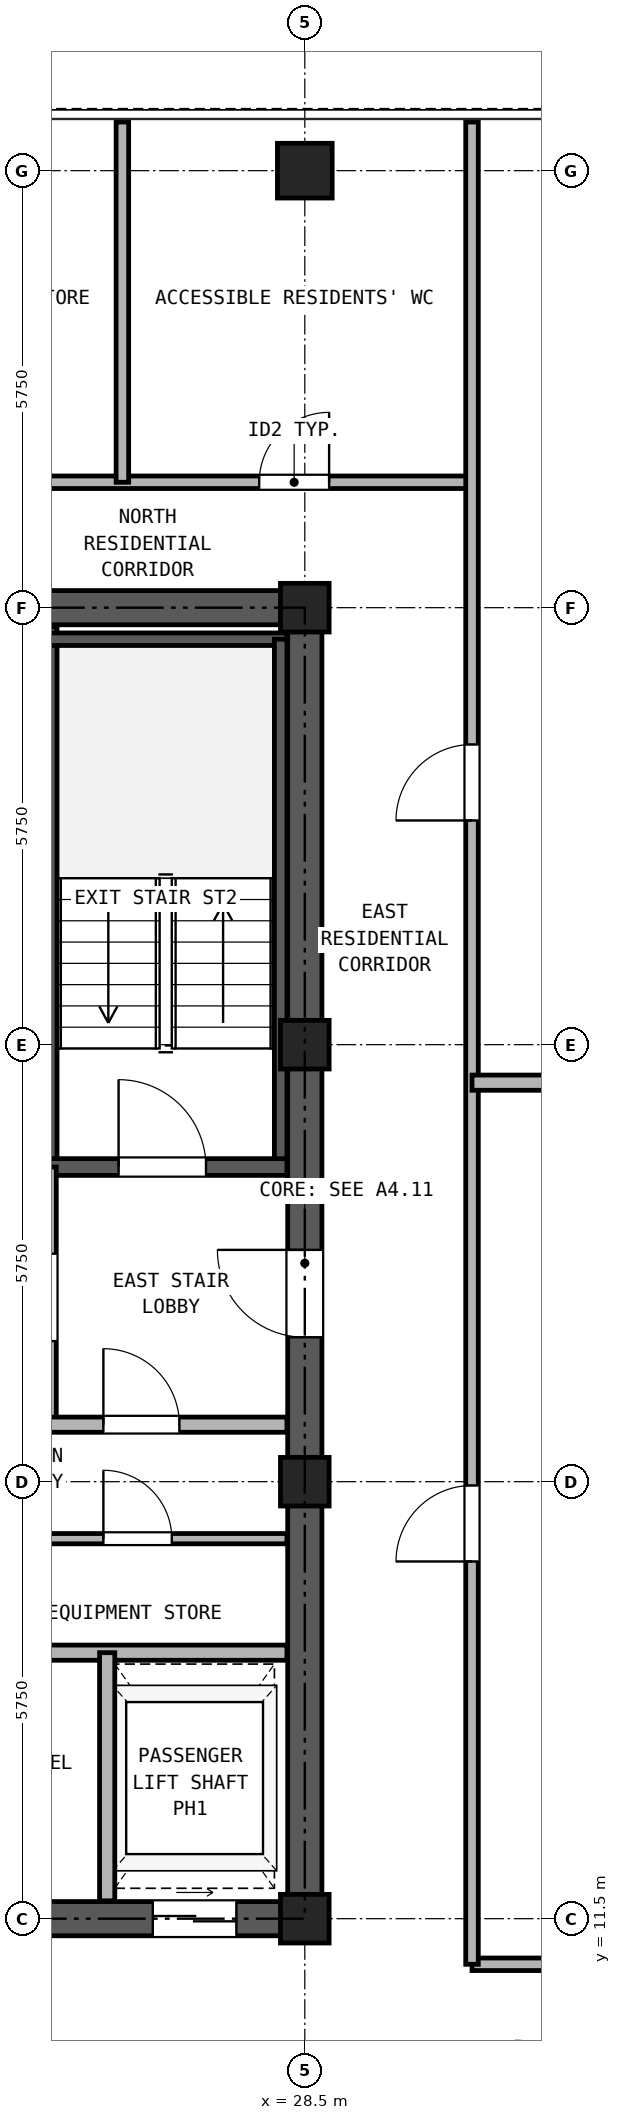
"""IFC4 building model, lengths in metres.
Left out: names, types, materials, properties, quantities, classifications, styles, units other than length and angle.
Written with IfcOpenShell. Run it as: python <this file> out.ifc"""

import sys

from ifc_helpers import new_model, si_unit, direction, frame, frame_2d, origin, origin_2d, place, context, subcontext, project, spatial, rectangle, hollow_rectangle, extrude, source, transform, mapped, element, fill, save


model = new_model("IFC4")
c1 = context("Model", 3, precision=1e-05, world=origin(), true_north=direction((0.0, 1.0)))
c2 = subcontext(c1, "Body", "Model", "MODEL_VIEW")
j1 = project(units=[si_unit("LENGTHUNIT", "METRE"), si_unit("PLANEANGLEUNIT", "RADIAN")], contexts=[c1])
p1 = place(None, origin())
s1 = spatial("IfcSite", under=j1, at=p1, CompositionType="ELEMENT")
p2 = place(p1, origin())
s2 = spatial("IfcBuilding", under=s1, at=p2, CompositionType="ELEMENT")
p3 = place(p2, frame((0.0, 0.0, 159.3)))
s3 = spatial("IfcBuildingStorey", under=s2, at=p3, CompositionType="ELEMENT", Elevation=159.3)
m1 = source(origin(), c2, "Body", "SweptSolid", [
    extrude(hollow_rectangle(XDim=0.72, YDim=0.72, WallThickness=0.04, at=origin_2d()), origin(), (0.0, 0.0, 1.0), 2.95),
])
p4 = place(p3, frame((28.5, 34.5, 0.0), z_axis=(0.0, 0.0, 1.0), x_axis=(1.0, 0.0, 0.0)))
e1 = element("IfcColumn", 1, at=p4, inside=s3, PredefinedType="COLUMN", context=c2, shape_type="MappedRepresentation", body=[
    mapped(m1, transform((0.0, 0.0, 0.0), x_axis=(1.0, 0.0, 0.0), y_axis=(0.0, 1.0, 0.0), z_axis=(0.0, 0.0, 1.0), scale=1.0)),
])
m2 = source(origin(), c2, "Body", "SweptSolid", [
    extrude(hollow_rectangle(XDim=0.64, YDim=0.64, WallThickness=0.035, at=origin_2d()), origin(), (0.0, 0.0, 1.0), 2.95),
])
for number, where, z_axis, x_axis in (
    (2, (28.5, 11.5, 0.0), (0.0, 0.0, 1.0), (1.0, 0.0, 0.0)),
    (3, (28.5, 17.25, 0.0), (0.0, 0.0, 1.0), (1.0, 0.0, 0.0)),
    (4, (28.5, 23.0, 0.0), (0.0, 0.0, 1.0), (1.0, 0.0, 0.0)),
    (5, (28.5, 28.75, 0.0), (0.0, 0.0, 1.0), (1.0, 0.0, 0.0)),
):
    element("IfcColumn", number, at=place(p3, frame(where, z_axis=z_axis, x_axis=x_axis)), inside=s3, PredefinedType="COLUMN", context=c2, shape_type="MappedRepresentation", body=[
        mapped(m2, transform((0.0, 0.0, 0.0), x_axis=(1.0, 0.0, 0.0), y_axis=(0.0, 1.0, 0.0), z_axis=(0.0, 0.0, 1.0), scale=1.0)),
    ])
p5 = place(p3, frame((18.275, 11.5, 0.0), z_axis=(0.0, 0.0, 1.0), x_axis=(1.0, 0.0, 0.0)))
e6 = element("IfcWall", 6, at=p5, inside=s3, PredefinedType="SHEAR", context=c2, shape_type="SweptSolid", body=[
    extrude(rectangle(XDim=10.45, YDim=0.45, at=frame_2d((5.225, 0.0))), origin(), (0.0, 0.0, 1.0), 2.95),
])
p6 = place(p5, frame((1.825, 0.0, 0.0)))
e7 = element("IfcOpeningElement", 7, at=p6, cuts=e6, PredefinedType="OPENING", context=c2, shape_type="SweptSolid", body=[
    extrude(rectangle(XDim=0.95, YDim=2.15, at=frame_2d((0.475, 1.075))), frame((0.0, 0.235, 0.0), z_axis=(0.0, -1.0, 0.0), x_axis=(1.0, 0.0, 0.0)), (0.0, 0.0, 1.0), 0.47),
])
p7 = place(p5, frame((5.325, 0.0, 0.0)))
e8 = element("IfcOpeningElement", 8, at=p7, cuts=e6, PredefinedType="OPENING", context=c2, shape_type="SweptSolid", body=[
    extrude(rectangle(XDim=0.95, YDim=2.15, at=frame_2d((0.475, 1.075))), frame((0.0, 0.235, 0.0), z_axis=(0.0, -1.0, 0.0), x_axis=(1.0, 0.0, 0.0)), (0.0, 0.0, 1.0), 0.47),
])
p8 = place(p5, frame((8.225, 0.0, 0.0)))
e9 = element("IfcOpeningElement", 9, at=p8, cuts=e6, PredefinedType="OPENING", context=c2, shape_type="SweptSolid", body=[
    extrude(rectangle(XDim=1.1, YDim=2.25, at=frame_2d((0.55, 1.125))), frame((0.0, 0.235, 0.0), z_axis=(0.0, -1.0, 0.0), x_axis=(1.0, 0.0, 0.0)), (0.0, 0.0, 1.0), 0.47),
])
p9 = place(p3, frame((18.275, 28.75, 0.0), z_axis=(0.0, 0.0, 1.0), x_axis=(1.0, 0.0, 0.0)))
e10 = element("IfcWall", 10, at=p9, inside=s3, PredefinedType="SHEAR", context=c2, shape_type="SweptSolid", body=[
    extrude(rectangle(XDim=10.45, YDim=0.45, at=frame_2d((5.225, 0.0))), origin(), (0.0, 0.0, 1.0), 2.95),
])
p10 = place(p9, frame((4.105, 0.0, 0.0)))
e11 = element("IfcOpeningElement", 11, at=p10, cuts=e10, PredefinedType="OPENING", context=c2, shape_type="SweptSolid", body=[
    extrude(rectangle(XDim=0.9, YDim=2.05, at=frame_2d((0.45, 1.025))), frame((0.0, 0.235, 0.0), z_axis=(0.0, -1.0, 0.0), x_axis=(1.0, 0.0, 0.0)), (0.0, 0.0, 1.0), 0.47),
])
p11 = place(p9, frame((5.645, 0.0, 0.0)))
e12 = element("IfcOpeningElement", 12, at=p11, cuts=e10, PredefinedType="OPENING", context=c2, shape_type="SweptSolid", body=[
    extrude(rectangle(XDim=0.9, YDim=2.05, at=frame_2d((0.45, 1.025))), frame((0.0, 0.235, 0.0), z_axis=(0.0, -1.0, 0.0), x_axis=(1.0, 0.0, 0.0)), (0.0, 0.0, 1.0), 0.47),
])
p12 = place(p3, frame((28.5, 11.725, 0.0), z_axis=(0.0, 0.0, 1.0), x_axis=(0.0, 1.0, 0.0)))
e13 = element("IfcWall", 13, at=p12, inside=s3, PredefinedType="SHEAR", context=c2, shape_type="SweptSolid", body=[
    extrude(rectangle(XDim=16.8, YDim=0.45, at=frame_2d((8.4, 0.0))), origin(), (0.0, 0.0, 1.0), 2.95),
])
p13 = place(p12, frame((7.425, 0.0, 0.0)))
e14 = element("IfcOpeningElement", 14, at=p13, cuts=e13, PredefinedType="OPENING", context=c2, shape_type="SweptSolid", body=[
    extrude(rectangle(XDim=1.15, YDim=2.2, at=frame_2d((0.575, 1.1))), frame((0.0, 0.235, 0.0), z_axis=(0.0, -1.0, 0.0), x_axis=(1.0, 0.0, 0.0)), (0.0, 0.0, 1.0), 0.47),
])
p14 = place(p3, frame((25.13, 21.39, 0.0), z_axis=(0.0, 0.0, 1.0), x_axis=(0.0, 1.0, 0.0)))
e15 = element("IfcWall", 15, at=p14, inside=s3, PredefinedType="SOLIDWALL", context=c2, shape_type="SweptSolid", body=[
    extrude(rectangle(XDim=7.11, YDim=0.22, at=frame_2d((3.555, 0.0))), origin(), (0.0, 0.0, 1.0), 2.95),
])
p15 = place(p3, frame((25.13, 28.335, 0.0), z_axis=(0.0, 0.0, 1.0), x_axis=(1.0, 0.0, 0.0)))
e16 = element("IfcWall", 16, at=p15, inside=s3, PredefinedType="PARTITIONING", context=c2, shape_type="SweptSolid", body=[
    extrude(rectangle(XDim=3.135, YDim=0.165, at=frame_2d((1.567, 0.0))), origin(), (0.0, 0.0, 1.0), 2.95),
])
p16 = place(p3, frame((28.183, 21.39, 0.0), z_axis=(0.0, 0.0, 1.0), x_axis=(0.0, 1.0, 0.0)))
e17 = element("IfcWall", 17, at=p16, inside=s3, PredefinedType="PARTITIONING", context=c2, shape_type="SweptSolid", body=[
    extrude(rectangle(XDim=6.945, YDim=0.165, at=frame_2d((3.473, 0.0))), origin(), (0.0, 0.0, 1.0), 2.95),
])
p17 = place(p3, frame((25.13, 21.39, 0.0), z_axis=(0.0, 0.0, 1.0), x_axis=(1.0, 0.0, 0.0)))
e18 = element("IfcWall", 18, at=p17, inside=s3, PredefinedType="SOLIDWALL", context=c2, shape_type="SweptSolid", body=[
    extrude(rectangle(XDim=3.135, YDim=0.22, at=frame_2d((1.567, 0.0))), origin(), (0.0, 0.0, 1.0), 2.95),
])
p18 = place(p17, frame((0.92, 0.0, 0.0)))
e19 = element("IfcOpeningElement", 19, at=p18, cuts=e18, PredefinedType="OPENING", context=c2, shape_type="SweptSolid", body=[
    extrude(rectangle(XDim=1.15, YDim=2.2, at=frame_2d((0.575, 1.1))), frame((0.0, 0.12, 0.0), z_axis=(0.0, -1.0, 0.0), x_axis=(1.0, 0.0, 0.0)), (0.0, 0.0, 1.0), 0.24),
])
p19 = place(p3, frame((25.13, 18.0, 0.0), z_axis=(0.0, 0.0, 1.0), x_axis=(0.0, 1.0, 0.0)))
e20 = element("IfcWall", 20, at=p19, inside=s3, PredefinedType="PARTITIONING", context=c2, shape_type="SweptSolid", body=[
    extrude(rectangle(XDim=3.39, YDim=0.2, at=frame_2d((1.695, 0.0))), origin(), (0.0, 0.0, 1.0), 2.95),
])
p20 = place(p19, frame((1.1, 0.0, 0.0)))
e21 = element("IfcOpeningElement", 21, at=p20, cuts=e20, PredefinedType="OPENING", context=c2, shape_type="SweptSolid", body=[
    extrude(rectangle(XDim=1.15, YDim=2.2, at=frame_2d((0.575, 1.1))), frame((0.0, 0.11, 0.0), z_axis=(0.0, -1.0, 0.0), x_axis=(1.0, 0.0, 0.0)), (0.0, 0.0, 1.0), 0.22),
])
p21 = place(p3, frame((18.735, 18.0, 0.0), z_axis=(0.0, 0.0, 1.0), x_axis=(1.0, 0.0, 0.0)))
e22 = element("IfcWall", 22, at=p21, inside=s3, PredefinedType="PARTITIONING", context=c2, shape_type="SweptSolid", body=[
    extrude(rectangle(XDim=9.53, YDim=0.2, at=frame_2d((4.765, 0.0))), origin(), (0.0, 0.0, 1.0), 2.95),
])
p22 = place(p21, frame((0.515, 0.0, 0.0)))
e23 = element("IfcOpeningElement", 23, at=p22, cuts=e22, PredefinedType="OPENING", context=c2, shape_type="SweptSolid", body=[
    extrude(rectangle(XDim=1.3, YDim=2.3, at=frame_2d((0.65, 1.15))), frame((0.0, 0.11, 0.0), z_axis=(0.0, -1.0, 0.0), x_axis=(1.0, 0.0, 0.0)), (0.0, 0.0, 1.0), 0.22),
])
p23 = place(p21, frame((2.615, 0.0, 0.0)))
e24 = element("IfcOpeningElement", 24, at=p23, cuts=e22, PredefinedType="OPENING", context=c2, shape_type="SweptSolid", body=[
    extrude(rectangle(XDim=1.3, YDim=2.3, at=frame_2d((0.65, 1.15))), frame((0.0, 0.11, 0.0), z_axis=(0.0, -1.0, 0.0), x_axis=(1.0, 0.0, 0.0)), (0.0, 0.0, 1.0), 0.22),
])
p24 = place(p21, frame((7.115, 0.0, 0.0)))
e25 = element("IfcOpeningElement", 25, at=p24, cuts=e22, PredefinedType="OPENING", context=c2, shape_type="SweptSolid", body=[
    extrude(rectangle(XDim=1.0, YDim=2.15, at=frame_2d((0.5, 1.075))), frame((0.0, 0.11, 0.0), z_axis=(0.0, -1.0, 0.0), x_axis=(1.0, 0.0, 0.0)), (0.0, 0.0, 1.0), 0.22),
])
p25 = place(p3, frame((18.735, 15.0, 0.0), z_axis=(0.0, 0.0, 1.0), x_axis=(1.0, 0.0, 0.0)))
e26 = element("IfcWall", 26, at=p25, inside=s3, PredefinedType="PARTITIONING", context=c2, shape_type="SweptSolid", body=[
    extrude(rectangle(XDim=9.53, YDim=0.2, at=frame_2d((4.765, 0.0))), origin(), (0.0, 0.0, 1.0), 2.95),
])
p26 = place(p3, frame((23.3, 16.5, 0.0), z_axis=(0.0, 0.0, 1.0), x_axis=(1.0, 0.0, 0.0)))
e27 = element("IfcWall", 27, at=p26, inside=s3, PredefinedType="PARTITIONING", context=c2, shape_type="SweptSolid", body=[
    extrude(rectangle(XDim=4.965, YDim=0.135, at=frame_2d((2.482, 0.0))), origin(), (0.0, 0.0, 1.0), 2.95),
])
p27 = place(p26, frame((2.55, 0.0, 0.0)))
e28 = element("IfcOpeningElement", 28, at=p27, cuts=e27, PredefinedType="OPENING", context=c2, shape_type="SweptSolid", body=[
    extrude(rectangle(XDim=0.9, YDim=2.05, at=frame_2d((0.45, 1.025))), frame((0.0, 0.077, 0.0), z_axis=(0.0, -1.0, 0.0), x_axis=(1.0, 0.0, 0.0)), (0.0, 0.0, 1.0), 0.155),
])
p28 = place(p3, frame((25.9, 11.735, 0.0), z_axis=(0.0, 0.0, 1.0), x_axis=(0.0, 1.0, 0.0)))
e29 = element("IfcWall", 29, at=p28, inside=s3, PredefinedType="PARTITIONING", context=c2, shape_type="SweptSolid", body=[
    extrude(rectangle(XDim=3.265, YDim=0.2, at=frame_2d((1.632, 0.0))), origin(), (0.0, 0.0, 1.0), 2.95),
])
p29 = place(p3, frame((30.7, 10.9, 0.0), z_axis=(0.0, 0.0, 1.0), x_axis=(1.0, 0.0, 0.0)))
e30 = element("IfcWall", 30, at=p29, inside=s3, PredefinedType="PARTITIONING", context=c2, shape_type="SweptSolid", body=[
    extrude(rectangle(XDim=7.5, YDim=0.165, at=frame_2d((3.75, 0.0))), origin(), (0.0, 0.0, 1.0), 2.95),
])
p30 = place(p3, frame((16.3, 30.4, 0.0), z_axis=(0.0, 0.0, 1.0), x_axis=(1.0, 0.0, 0.0)))
e31 = element("IfcWall", 31, at=p30, inside=s3, PredefinedType="PARTITIONING", context=c2, shape_type="SweptSolid", body=[
    extrude(rectangle(XDim=14.4, YDim=0.165, at=frame_2d((7.2, 0.0))), origin(), (0.0, 0.0, 1.0), 2.95),
])
p31 = place(p30, frame((2.35, 0.0, 0.0)))
e32 = element("IfcOpeningElement", 32, at=p31, cuts=e31, PredefinedType="OPENING", context=c2, shape_type="SweptSolid", body=[
    extrude(rectangle(XDim=0.95, YDim=2.15, at=frame_2d((0.475, 1.075))), frame((0.0, 0.093, 0.0), z_axis=(0.0, -1.0, 0.0), x_axis=(1.0, 0.0, 0.0)), (0.0, 0.0, 1.0), 0.185),
])
p32 = place(p30, frame((7.25, 0.0, 0.0)))
e33 = element("IfcOpeningElement", 33, at=p32, cuts=e31, PredefinedType="OPENING", context=c2, shape_type="SweptSolid", body=[
    extrude(rectangle(XDim=0.95, YDim=2.15, at=frame_2d((0.475, 1.075))), frame((0.0, 0.093, 0.0), z_axis=(0.0, -1.0, 0.0), x_axis=(1.0, 0.0, 0.0)), (0.0, 0.0, 1.0), 0.185),
])
p33 = place(p30, frame((11.6, 0.0, 0.0)))
e34 = element("IfcOpeningElement", 34, at=p33, cuts=e31, PredefinedType="OPENING", context=c2, shape_type="SweptSolid", body=[
    extrude(rectangle(XDim=0.92, YDim=2.1, at=frame_2d((0.46, 1.05))), frame((0.0, 0.093, 0.0), z_axis=(0.0, -1.0, 0.0), x_axis=(1.0, 0.0, 0.0)), (0.0, 0.0, 1.0), 0.185),
])
p34 = place(p3, frame((30.7, 10.9, 0.0), z_axis=(0.0, 0.0, 1.0), x_axis=(0.0, 1.0, 0.0)))
e35 = element("IfcWall", 35, at=p34, inside=s3, PredefinedType="PARTITIONING", context=c2, shape_type="SweptSolid", body=[
    extrude(rectangle(XDim=24.24, YDim=0.165, at=frame_2d((12.12, 0.0))), origin(), (0.0, 0.0, 1.0), 2.95),
])
p35 = place(p34, frame((5.3, 0.0, 0.0)))
e36 = element("IfcOpeningElement", 36, at=p35, cuts=e35, PredefinedType="OPENING", context=c2, shape_type="SweptSolid", body=[
    extrude(rectangle(XDim=1.0, YDim=2.15, at=frame_2d((0.5, 1.075))), frame((0.0, 0.093, 0.0), z_axis=(0.0, -1.0, 0.0), x_axis=(1.0, 0.0, 0.0)), (0.0, 0.0, 1.0), 0.185),
])
p36 = place(p34, frame((15.05, 0.0, 0.0)))
e37 = element("IfcOpeningElement", 37, at=p36, cuts=e35, PredefinedType="OPENING", context=c2, shape_type="SweptSolid", body=[
    extrude(rectangle(XDim=1.0, YDim=2.15, at=frame_2d((0.5, 1.075))), frame((0.0, 0.093, 0.0), z_axis=(0.0, -1.0, 0.0), x_axis=(1.0, 0.0, 0.0)), (0.0, 0.0, 1.0), 0.185),
])
p37 = place(p3, frame((30.7, 22.5, 0.0), z_axis=(0.0, 0.0, 1.0), x_axis=(1.0, 0.0, 0.0)))
e38 = element("IfcWall", 38, at=p37, inside=s3, PredefinedType="PARTITIONING", context=c2, shape_type="SweptSolid", body=[
    extrude(rectangle(XDim=10.94, YDim=0.2, at=frame_2d((5.47, 0.0))), origin(), (0.0, 0.0, 1.0), 2.95),
])
p38 = place(p3, frame((26.1, 30.4, 0.0), z_axis=(0.0, 0.0, 1.0), x_axis=(0.0, 1.0, 0.0)))
e39 = element("IfcWall", 39, at=p38, inside=s3, PredefinedType="PARTITIONING", context=c2, shape_type="SweptSolid", body=[
    extrude(rectangle(XDim=4.74, YDim=0.165, at=frame_2d((2.37, 0.0))), origin(), (0.0, 0.0, 1.0), 2.95),
])
p39 = place(p18, frame((1.15, 0.0, 0.0), z_axis=(0.0, 0.0, 1.0), x_axis=(-1.0, 0.0, 0.0)))
e40 = element("IfcDoor", 40, at=p39, inside=s3, OperationType="SINGLE_SWING_LEFT", PredefinedType="DOOR", context=c2, shape_type="SweptSolid", body=[
    extrude(rectangle(XDim=1.15, YDim=2.2, at=frame_2d((0.575, 1.1))), frame((0.0, 0.025, 0.0), z_axis=(0.0, -1.0, 0.0), x_axis=(1.0, 0.0, 0.0)), (0.0, 0.0, 1.0), 0.05),
])
fill(e19, e40)
p40 = place(p24, frame((1.0, 0.0, 0.0), z_axis=(0.0, 0.0, 1.0), x_axis=(-1.0, 0.0, 0.0)))
e41 = element("IfcDoor", 41, at=p40, inside=s3, OperationType="SINGLE_SWING_LEFT", PredefinedType="DOOR", context=c2, shape_type="SweptSolid", body=[
    extrude(rectangle(XDim=1.0, YDim=2.15, at=frame_2d((0.5, 1.075))), frame((0.0, 0.025, 0.0), z_axis=(0.0, -1.0, 0.0), x_axis=(1.0, 0.0, 0.0)), (0.0, 0.0, 1.0), 0.05),
])
fill(e25, e41)
p41 = place(p27, frame((0.9, 0.0, 0.0), z_axis=(0.0, 0.0, 1.0), x_axis=(-1.0, 0.0, 0.0)))
e42 = element("IfcDoor", 42, at=p41, inside=s3, OperationType="SINGLE_SWING_LEFT", PredefinedType="DOOR", context=c2, shape_type="SweptSolid", body=[
    extrude(rectangle(XDim=0.9, YDim=2.05, at=frame_2d((0.45, 1.025))), frame((0.0, 0.025, 0.0), z_axis=(0.0, -1.0, 0.0), x_axis=(1.0, 0.0, 0.0)), (0.0, 0.0, 1.0), 0.05),
])
fill(e28, e42)
p42 = place(p13, origin())
e43 = element("IfcDoor", 43, at=p42, inside=s3, OperationType="SINGLE_SWING_RIGHT", PredefinedType="DOOR", context=c2, shape_type="SweptSolid", body=[
    extrude(rectangle(XDim=1.15, YDim=2.2, at=frame_2d((0.575, 1.1))), frame((0.0, 0.025, 0.0), z_axis=(0.0, -1.0, 0.0), x_axis=(1.0, 0.0, 0.0)), (0.0, 0.0, 1.0), 0.05),
])
fill(e14, e43)
p43 = place(p8, frame((1.1, 0.0, 0.0), z_axis=(0.0, 0.0, 1.0), x_axis=(-1.0, 0.0, 0.0)))
e44 = element("IfcDoor", 44, at=p43, inside=s3, OperationType="DOUBLE_DOOR_SLIDING", PredefinedType="DOOR", context=c2, shape_type="SweptSolid", body=[
    extrude(rectangle(XDim=1.1, YDim=2.25, at=frame_2d((0.55, 1.125))), frame((0.0, 0.025, 0.0), z_axis=(0.0, -1.0, 0.0), x_axis=(1.0, 0.0, 0.0)), (0.0, 0.0, 1.0), 0.05),
])
fill(e9, e44)
p44 = place(p35, frame((1.0, 0.0, 0.0), z_axis=(0.0, 0.0, 1.0), x_axis=(-1.0, 0.0, 0.0)))
e45 = element("IfcDoor", 45, at=p44, inside=s3, OperationType="SINGLE_SWING_LEFT", PredefinedType="DOOR", context=c2, shape_type="SweptSolid", body=[
    extrude(rectangle(XDim=1.0, YDim=2.15, at=frame_2d((0.5, 1.075))), frame((0.0, 0.025, 0.0), z_axis=(0.0, -1.0, 0.0), x_axis=(1.0, 0.0, 0.0)), (0.0, 0.0, 1.0), 0.05),
])
fill(e36, e45)
p45 = place(p36, frame((1.0, 0.0, 0.0), z_axis=(0.0, 0.0, 1.0), x_axis=(-1.0, 0.0, 0.0)))
e46 = element("IfcDoor", 46, at=p45, inside=s3, OperationType="SINGLE_SWING_LEFT", PredefinedType="DOOR", context=c2, shape_type="SweptSolid", body=[
    extrude(rectangle(XDim=1.0, YDim=2.15, at=frame_2d((0.5, 1.075))), frame((0.0, 0.025, 0.0), z_axis=(0.0, -1.0, 0.0), x_axis=(1.0, 0.0, 0.0)), (0.0, 0.0, 1.0), 0.05),
])
fill(e37, e46)
p46 = place(p33, origin())
e47 = element("IfcDoor", 47, at=p46, inside=s3, OperationType="SINGLE_SWING_RIGHT", PredefinedType="DOOR", context=c2, shape_type="SweptSolid", body=[
    extrude(rectangle(XDim=0.92, YDim=2.1, at=frame_2d((0.46, 1.05))), frame((0.0, 0.025, 0.0), z_axis=(0.0, -1.0, 0.0), x_axis=(1.0, 0.0, 0.0)), (0.0, 0.0, 1.0), 0.05),
])
fill(e34, e47)
save(model, sys.argv[1])
